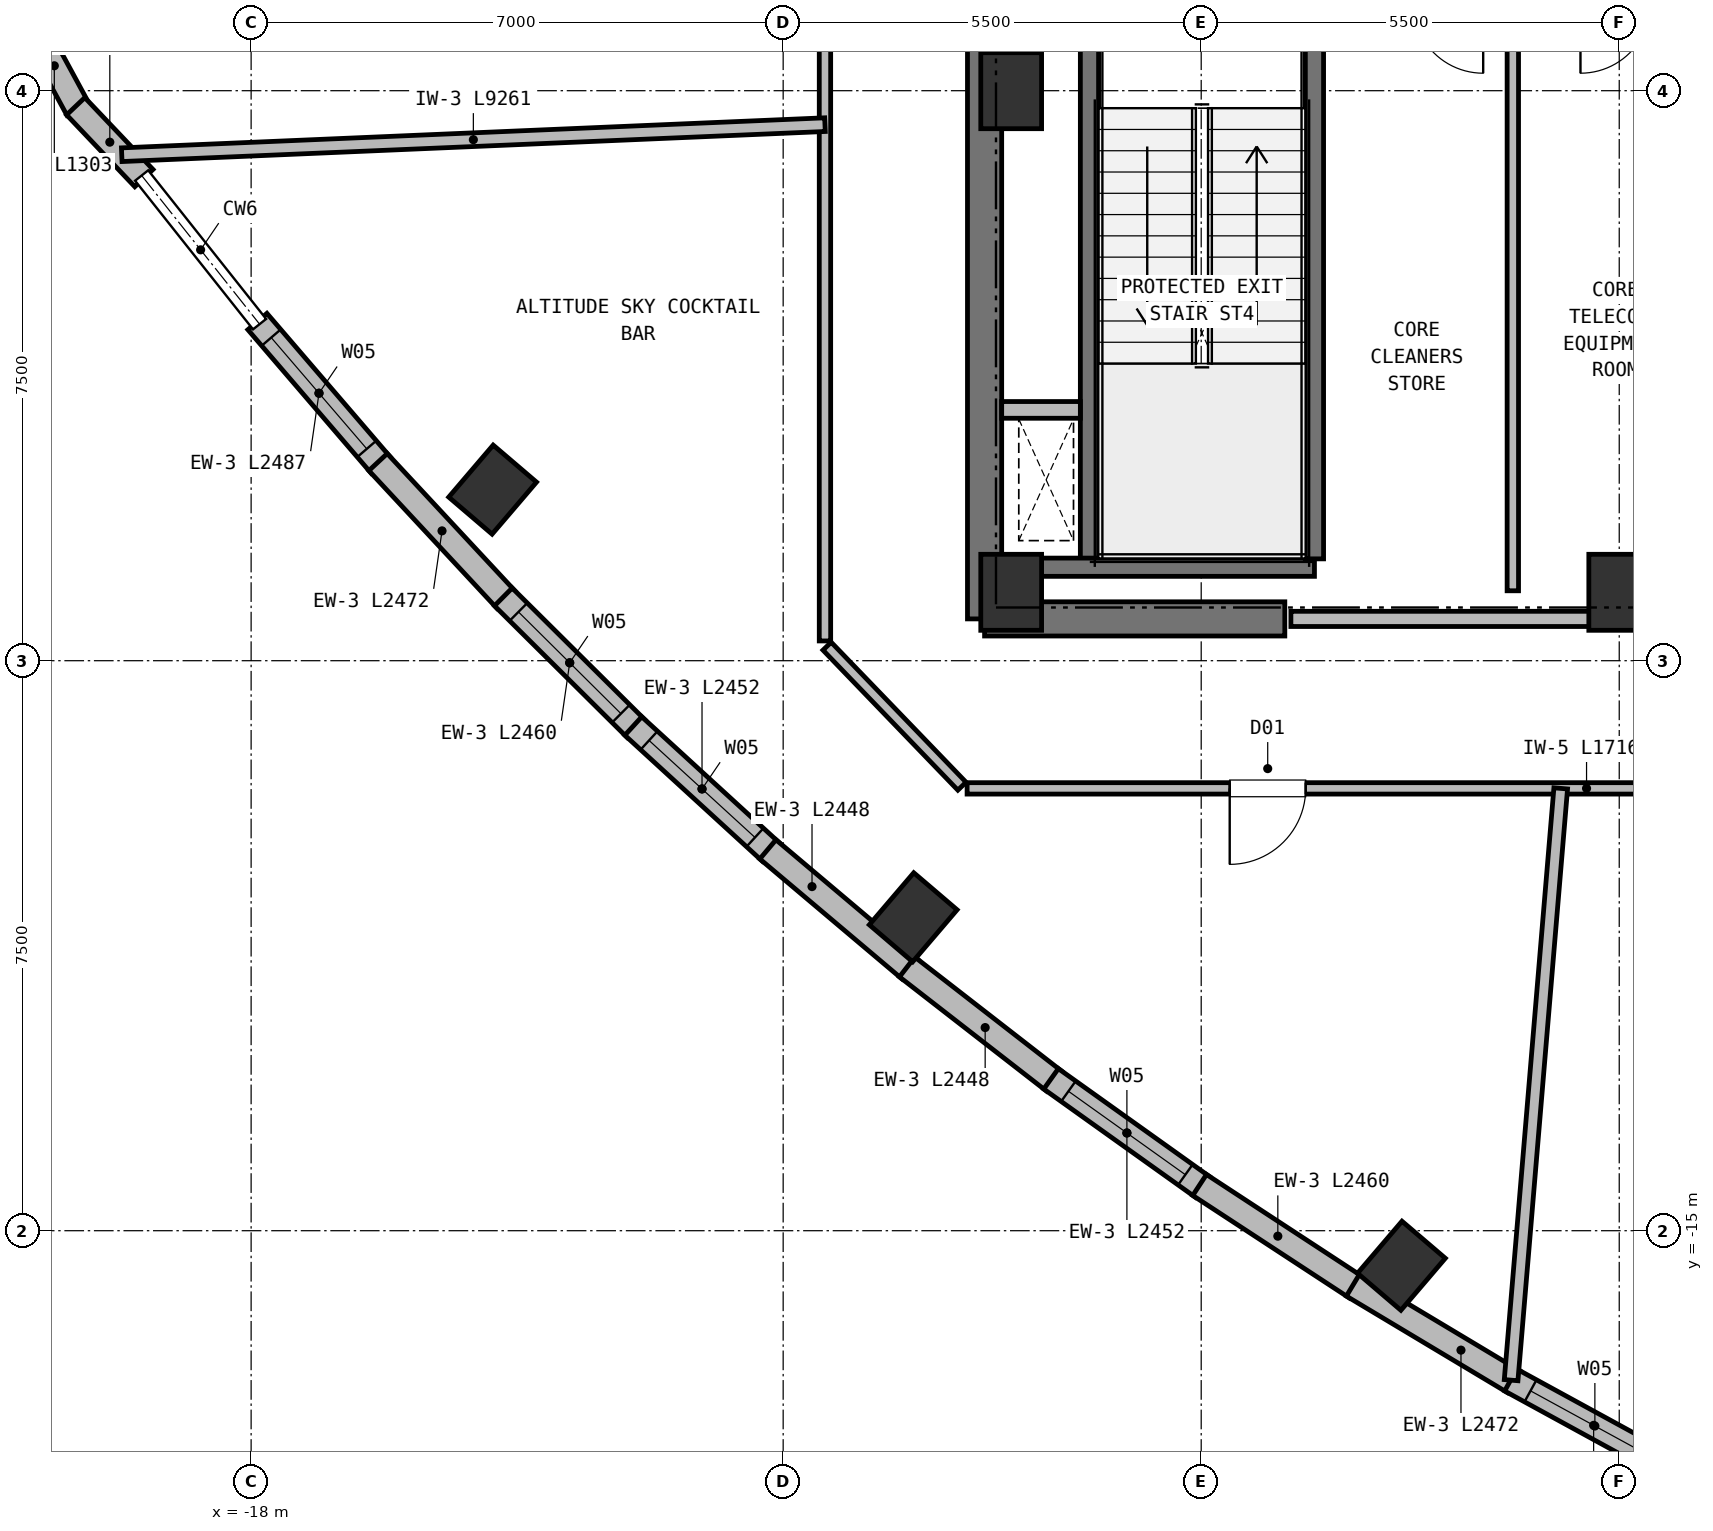
"""IFC4 building model, lengths in metres.
Left out: names, types, materials, properties, quantities, classifications, styles, units other than length and angle.
Written with IfcOpenShell. Run it as: python <this file> out.ifc"""

import sys

from ifc_helpers import new_model, si_unit, direction, frame, frame_2d, origin, origin_2d, place, context, subcontext, project, spatial, rectangle, extrude, element, fill, save


model = new_model("IFC4")
c1 = context("Model", 3, precision=1e-05, world=origin(), true_north=direction((0.0, 1.0)))
c2 = subcontext(c1, "Body", "Model", "MODEL_VIEW")
j1 = project(units=[si_unit("LENGTHUNIT", "METRE"), si_unit("PLANEANGLEUNIT", "RADIAN")], contexts=[c1])
p1 = place(None, origin())
s1 = spatial("IfcSite", under=j1, at=p1, CompositionType="ELEMENT")
p2 = place(p1, origin())
s2 = spatial("IfcBuilding", under=s1, at=p2, CompositionType="ELEMENT")
p3 = place(p2, frame((0.0, 0.0, 281.6)))
s3 = spatial("IfcBuildingStorey", under=s2, at=p3, CompositionType="ELEMENT", Elevation=281.6)
for number, where, z_axis, x_axis in (
    (1, (-8.0, -6.6, 0.0), (0.0, 0.0, 1.0), (1.0, 0.0, 0.0)),
    (2, (0.0, -6.6, 0.0), (0.0, 0.0, 1.0), (1.0, 0.0, 0.0)),
    (3, (-8.0, 0.0, 0.0), (0.0, 0.0, 1.0), (1.0, 0.0, 0.0)),
):
    element("IfcColumn", number, at=place(p3, frame(where, z_axis=z_axis, x_axis=x_axis)), inside=s3, PredefinedType="COLUMN", context=c2, shape_type="SweptSolid", body=[
        extrude(rectangle(XDim=0.8, YDim=1.0, at=origin_2d()), origin(), (0.0, 0.0, 1.0), 4.4),
    ])
p4 = place(p3, frame((-8.35, -6.95, 0.0), z_axis=(0.0, 0.0, 1.0), x_axis=(1.0, 0.0, 0.0)))
e4 = element("IfcWall", 4, at=p4, inside=s3, PredefinedType="SHEAR", context=c2, shape_type="SweptSolid", body=[
    extrude(rectangle(XDim=3.95, YDim=0.45, at=frame_2d((1.975, 0.0))), origin(), (0.0, 0.0, 1.0), 4.13),
])
p5 = place(p3, frame((-8.35, -6.95, 0.0), z_axis=(0.0, 0.0, 1.0), x_axis=(0.0, 1.0, 0.0)))
e5 = element("IfcWall", 5, at=p5, inside=s3, PredefinedType="SHEAR", context=c2, shape_type="SweptSolid", body=[
    extrude(rectangle(XDim=8.1, YDim=0.45, at=frame_2d((4.05, 0.0))), origin(), (0.0, 0.0, 1.0), 4.13),
])
for number, where, z_axis, x_axis in (
    (6, (-14.823, -5.249, 0.0), (0.0, 0.0, 1.0), (-0.76, 0.649, 0.0)),
    (7, (-9.289, -10.876, 0.0), (0.0, 0.0, 1.0), (-0.76, 0.649, 0.0)),
    (8, (-2.865, -15.461, 0.0), (0.0, 0.0, 1.0), (-0.76, 0.649, 0.0)),
):
    element("IfcColumn", number, at=place(p3, frame(where, z_axis=z_axis, x_axis=x_axis)), inside=s3, PredefinedType="COLUMN", context=c2, shape_type="SweptSolid", body=[
        extrude(rectangle(XDim=0.75, YDim=0.9, at=origin_2d()), origin(), (0.0, 0.0, 1.0), 4.4),
    ])
p6 = place(p3, frame((-20.279, -0.245, 0.0), z_axis=(0.0, 0.0, 1.0), x_axis=(-0.477236579478, 0.878774855812, 0.0)))
e9 = element("IfcWall", 9, at=p6, inside=s3, PredefinedType="SOLIDWALL", context=c2, shape_type="SweptSolid", body=[
    extrude(rectangle(XDim=1.303, YDim=0.33, at=frame_2d((0.651, 0.0))), origin(), (0.0, 0.0, 1.0), 4.13),
])
p7 = place(p3, frame((-19.411, -1.15, 0.0), z_axis=(0.0, 0.0, 1.0), x_axis=(-0.688316050819, 0.725410927809, 0.0)))
e10 = element("IfcWall", 10, at=p7, inside=s3, PredefinedType="SOLIDWALL", context=c2, shape_type="SweptSolid", body=[
    extrude(rectangle(XDim=1.303, YDim=0.33, at=frame_2d((0.652, 0.0))), origin(), (0.0, 0.0, 1.0), 4.13),
])
p8 = place(p3, frame((-16.297, -4.924, 0.0), z_axis=(0.0, 0.0, 1.0), x_axis=(-0.651591190477, 0.75857031348, 0.0)))
e11 = element("IfcWall", 11, at=p8, inside=s3, PredefinedType="SOLIDWALL", context=c2, shape_type="SweptSolid", body=[
    extrude(rectangle(XDim=2.488, YDim=0.33, at=frame_2d((1.244, 0.0))), origin(), (0.0, 0.0, 1.0), 4.13),
])
p9 = place(p8, frame((0.279, 0.0, 0.72)))
e12 = element("IfcOpeningElement", 12, at=p9, cuts=e11, PredefinedType="OPENING", context=c2, shape_type="SweptSolid", body=[
    extrude(rectangle(XDim=1.93, YDim=2.15, at=frame_2d((0.965, 1.075))), frame((0.0, 0.175, 0.0), z_axis=(0.0, -1.0, 0.0), x_axis=(1.0, 0.0, 0.0)), (0.0, 0.0, 1.0), 0.35),
])
p10 = place(p3, frame((-14.647, -6.697, 0.0), z_axis=(0.0, 0.0, 1.0), x_axis=(-0.681011582837, 0.732272643242, 0.0)))
e13 = element("IfcWall", 13, at=p10, inside=s3, PredefinedType="SOLIDWALL", context=c2, shape_type="SweptSolid", body=[
    extrude(rectangle(XDim=2.472, YDim=0.33, at=frame_2d((1.236, 0.0))), origin(), (0.0, 0.0, 1.0), 4.13),
])
p11 = place(p3, frame((-12.936, -8.394, 0.0), z_axis=(0.0, 0.0, 1.0), x_axis=(-0.709682736457, 0.704521407464, 0.0)))
e14 = element("IfcWall", 14, at=p11, inside=s3, PredefinedType="SOLIDWALL", context=c2, shape_type="SweptSolid", body=[
    extrude(rectangle(XDim=2.46, YDim=0.33, at=frame_2d((1.23, 0.0))), origin(), (0.0, 0.0, 1.0), 4.13),
])
p12 = place(p11, frame((0.28, 0.0, 0.72)))
e15 = element("IfcOpeningElement", 15, at=p12, cuts=e14, PredefinedType="OPENING", context=c2, shape_type="SweptSolid", body=[
    extrude(rectangle(XDim=1.9, YDim=2.15, at=frame_2d((0.95, 1.075))), frame((0.0, 0.175, 0.0), z_axis=(0.0, -1.0, 0.0), x_axis=(1.0, 0.0, 0.0)), (0.0, 0.0, 1.0), 0.35),
])
p13 = place(p3, frame((-11.164, -10.015, 0.0), z_axis=(0.0, 0.0, 1.0), x_axis=(-0.73744340021, 0.675408936487, 0.0)))
e16 = element("IfcWall", 16, at=p13, inside=s3, PredefinedType="SOLIDWALL", context=c2, shape_type="SweptSolid", body=[
    extrude(rectangle(XDim=2.452, YDim=0.33, at=frame_2d((1.226, 0.0))), origin(), (0.0, 0.0, 1.0), 4.13),
])
p14 = place(p13, frame((0.281, 0.0, 0.72)))
e17 = element("IfcOpeningElement", 17, at=p14, cuts=e16, PredefinedType="OPENING", context=c2, shape_type="SweptSolid", body=[
    extrude(rectangle(XDim=1.89, YDim=2.15, at=frame_2d((0.945, 1.075))), frame((0.0, 0.175, 0.0), z_axis=(0.0, -1.0, 0.0), x_axis=(1.0, 0.0, 0.0)), (0.0, 0.0, 1.0), 0.35),
])
p15 = place(p3, frame((-9.33, -11.561, 0.0), z_axis=(0.0, 0.0, 1.0), x_axis=(-0.764225429478, 0.644949217334, 0.0)))
e18 = element("IfcWall", 18, at=p15, inside=s3, PredefinedType="SOLIDWALL", context=c2, shape_type="SweptSolid", body=[
    extrude(rectangle(XDim=2.448, YDim=0.33, at=frame_2d((1.224, 0.0))), origin(), (0.0, 0.0, 1.0), 4.13),
])
p16 = place(p3, frame((-7.435, -13.031, 0.0), z_axis=(0.0, 0.0, 1.0), x_axis=(-0.789786954421, 0.613381257152, 0.0)))
e19 = element("IfcWall", 19, at=p16, inside=s3, PredefinedType="SOLIDWALL", context=c2, shape_type="SweptSolid", body=[
    extrude(rectangle(XDim=2.448, YDim=0.33, at=frame_2d((1.224, 0.0))), origin(), (0.0, 0.0, 1.0), 4.13),
])
p17 = place(p3, frame((-5.48, -14.427, 0.0), z_axis=(0.0, 0.0, 1.0), x_axis=(-0.813854547638, 0.581068649378, 0.0)))
e20 = element("IfcWall", 20, at=p17, inside=s3, PredefinedType="SOLIDWALL", context=c2, shape_type="SweptSolid", body=[
    extrude(rectangle(XDim=2.452, YDim=0.33, at=frame_2d((1.226, 0.0))), origin(), (0.0, 0.0, 1.0), 4.13),
])
p18 = place(p17, frame((0.281, 0.0, 0.72)))
e21 = element("IfcOpeningElement", 21, at=p18, cuts=e20, PredefinedType="OPENING", context=c2, shape_type="SweptSolid", body=[
    extrude(rectangle(XDim=1.89, YDim=2.15, at=frame_2d((0.945, 1.075))), frame((0.0, 0.175, 0.0), z_axis=(0.0, -1.0, 0.0), x_axis=(1.0, 0.0, 0.0)), (0.0, 0.0, 1.0), 0.35),
])
p19 = place(p3, frame((-3.463, -15.746, 0.0), z_axis=(0.0, 0.0, 1.0), x_axis=(-0.8366477668, 0.547741284101, 0.0)))
e22 = element("IfcWall", 22, at=p19, inside=s3, PredefinedType="SOLIDWALL", context=c2, shape_type="SweptSolid", body=[
    extrude(rectangle(XDim=2.46, YDim=0.33, at=frame_2d((1.23, 0.0))), origin(), (0.0, 0.0, 1.0), 4.13),
])
p20 = place(p3, frame((-1.385, -16.989, 0.0), z_axis=(0.0, 0.0, 1.0), x_axis=(-0.857841338579, 0.513914621143, 0.0)))
e23 = element("IfcWall", 23, at=p20, inside=s3, PredefinedType="SOLIDWALL", context=c2, shape_type="SweptSolid", body=[
    extrude(rectangle(XDim=2.472, YDim=0.33, at=frame_2d((1.236, 0.0))), origin(), (0.0, 0.0, 1.0), 4.13),
])
p21 = place(p3, frame((0.754, -18.157, 0.0), z_axis=(0.0, 0.0, 1.0), x_axis=(-0.877475074231, 0.479622241044, 0.0)))
e24 = element("IfcWall", 24, at=p21, inside=s3, PredefinedType="SOLIDWALL", context=c2, shape_type="SweptSolid", body=[
    extrude(rectangle(XDim=2.487, YDim=0.33, at=frame_2d((1.244, 0.0))), origin(), (0.0, 0.0, 1.0), 4.13),
])
p22 = place(p21, frame((0.26, 0.0, 0.72)))
e25 = element("IfcOpeningElement", 25, at=p22, cuts=e24, PredefinedType="OPENING", context=c2, shape_type="SweptSolid", body=[
    extrude(rectangle(XDim=1.93, YDim=2.15, at=frame_2d((0.965, 1.075))), frame((0.0, 0.175, 0.0), z_axis=(0.0, -1.0, 0.0), x_axis=(1.0, 0.0, 0.0)), (0.0, 0.0, 1.0), 0.35),
])
p23 = place(p3, frame((-6.97, -6.16, 0.0), z_axis=(0.0, 0.0, 1.0), x_axis=(0.0, 1.0, 0.0)))
e26 = element("IfcWall", 26, at=p23, inside=s3, PredefinedType="SHEAR", context=c2, shape_type="SweptSolid", body=[
    extrude(rectangle(XDim=7.22, YDim=0.24, at=frame_2d((3.61, 0.0))), origin(), (0.0, 0.0, 1.0), 4.13),
])
p24 = place(p3, frame((-7.6, -6.27, 0.0), z_axis=(0.0, 0.0, 1.0), x_axis=(1.0, 0.0, 0.0)))
e27 = element("IfcWall", 27, at=p24, inside=s3, PredefinedType="SHEAR", context=c2, shape_type="SweptSolid", body=[
    extrude(rectangle(XDim=3.59, YDim=0.24, at=frame_2d((1.795, 0.0))), origin(), (0.0, 0.0, 1.0), 4.13),
])
p25 = place(p3, frame((-4.01, -6.16, 0.0), z_axis=(0.0, 0.0, 1.0), x_axis=(0.0, 1.0, 0.0)))
e28 = element("IfcWall", 28, at=p25, inside=s3, PredefinedType="SHEAR", context=c2, shape_type="SweptSolid", body=[
    extrude(rectangle(XDim=7.22, YDim=0.24, at=frame_2d((3.61, 0.0))), origin(), (0.0, 0.0, 1.0), 4.13),
])
p26 = place(p3, frame((-8.125, -4.2, 0.0), z_axis=(0.0, 0.0, 1.0), x_axis=(1.0, 0.0, 0.0)))
e29 = element("IfcWall", 29, at=p26, inside=s3, PredefinedType="PARTITIONING", context=c2, shape_type="SweptSolid", body=[
    extrude(rectangle(XDim=1.035, YDim=0.22, at=frame_2d((0.518, 0.0))), origin(), (0.0, 0.0, 1.0), 4.13),
])
p27 = place(p3, frame((-4.32, -6.95, 0.0), z_axis=(0.0, 0.0, 1.0), x_axis=(1.0, 0.0, 0.0)))
e30 = element("IfcWall", 30, at=p27, inside=s3, PredefinedType="PARTITIONING", context=c2, shape_type="SweptSolid", body=[
    extrude(rectangle(XDim=8.64, YDim=0.2, at=frame_2d((4.32, 0.0))), origin(), (0.0, 0.0, 1.0), 4.13),
])
p28 = place(p3, frame((-1.4, -6.58, 0.0), z_axis=(0.0, 0.0, 1.0), x_axis=(0.0, 1.0, 0.0)))
e31 = element("IfcWall", 31, at=p28, inside=s3, PredefinedType="PARTITIONING", context=c2, shape_type="SweptSolid", body=[
    extrude(rectangle(XDim=7.53, YDim=0.15, at=frame_2d((3.765, 0.0))), origin(), (0.0, 0.0, 1.0), 4.13),
])
p29 = place(p3, frame((8.58, -9.18, 0.0), z_axis=(0.0, 0.0, 1.0), x_axis=(-1.0, 0.0, 0.0)))
e32 = element("IfcWall", 32, at=p29, inside=s3, PredefinedType="PARTITIONING", context=c2, shape_type="SweptSolid", body=[
    extrude(rectangle(XDim=17.16, YDim=0.15, at=frame_2d((8.58, 0.0))), origin(), (0.0, 0.0, 1.0), 3.84),
])
p30 = place(p29, frame((12.705, 0.0, 0.0)))
e33 = element("IfcOpeningElement", 33, at=p30, cuts=e32, PredefinedType="OPENING", context=c2, shape_type="SweptSolid", body=[
    extrude(rectangle(XDim=1.0, YDim=2.15, at=frame_2d((0.5, 1.075))), frame((0.0, 0.085, 0.0), z_axis=(0.0, -1.0, 0.0), x_axis=(1.0, 0.0, 0.0)), (0.0, 0.0, 1.0), 0.17),
])
p31 = place(p29, frame((4.315, 0.0, 0.0)))
e34 = element("IfcOpeningElement", 34, at=p31, cuts=e32, PredefinedType="OPENING", context=c2, shape_type="SweptSolid", body=[
    extrude(rectangle(XDim=1.0, YDim=2.15, at=frame_2d((0.5, 1.075))), frame((0.0, 0.085, 0.0), z_axis=(0.0, -1.0, 0.0), x_axis=(1.0, 0.0, 0.0)), (0.0, 0.0, 1.0), 0.17),
])
p32 = place(p3, frame((-10.45, -7.24, 0.0), z_axis=(0.0, 0.0, 1.0), x_axis=(0.0, 1.0, 0.0)))
e35 = element("IfcWall", 35, at=p32, inside=s3, PredefinedType="PARTITIONING", context=c2, shape_type="SweptSolid", body=[
    extrude(rectangle(XDim=9.63, YDim=0.15, at=frame_2d((4.815, 0.0))), origin(), (0.0, 0.0, 1.0), 4.13),
])
p33 = place(p3, frame((-8.648, -9.151, 0.0), z_axis=(0.0, 0.0, 1.0), x_axis=(-0.693764562202, 0.720201869085, 0.0)))
e36 = element("IfcWall", 36, at=p33, inside=s3, PredefinedType="PARTITIONING", context=c2, shape_type="SweptSolid", body=[
    extrude(rectangle(XDim=2.558, YDim=0.15, at=frame_2d((1.279, 0.0))), origin(), (0.0, 0.0, 1.0), 4.13),
])
p34 = place(p3, frame((-10.45, -0.447, 0.0), z_axis=(0.0, 0.0, 1.0), x_axis=(-0.999087626263, -0.042707318448, 0.0)))
e37 = element("IfcWall", 37, at=p34, inside=s3, PredefinedType="PARTITIONING", context=c2, shape_type="SweptSolid", body=[
    extrude(rectangle(XDim=9.261, YDim=0.18, at=frame_2d((4.63, 0.0))), origin(), (0.0, 0.0, 1.0), 4.13),
])
p35 = place(p3, frame((-0.77, -9.18, 0.0), z_axis=(0.0, 0.0, 1.0), x_axis=(-0.083547101012, -0.996503829352, 0.0)))
e38 = element("IfcWall", 38, at=p35, inside=s3, PredefinedType="PARTITIONING", context=c2, shape_type="SweptSolid", body=[
    extrude(rectangle(XDim=7.814, YDim=0.18, at=frame_2d((3.907, 0.0))), origin(), (0.0, 0.0, 1.0), 3.71),
])
p36 = place(p9, origin())
e39 = element("IfcWindow", 39, at=p36, inside=s3, PartitioningType="SINGLE_PANEL", PredefinedType="WINDOW", context=c2, shape_type="SweptSolid", body=[
    extrude(rectangle(XDim=1.93, YDim=2.15, at=frame_2d((0.965, 1.075))), frame((0.0, 0.03, 0.0), z_axis=(0.0, -1.0, 0.0), x_axis=(1.0, 0.0, 0.0)), (0.0, 0.0, 1.0), 0.06),
])
fill(e12, e39)
p37 = place(p12, origin())
e40 = element("IfcWindow", 40, at=p37, inside=s3, PartitioningType="SINGLE_PANEL", PredefinedType="WINDOW", context=c2, shape_type="SweptSolid", body=[
    extrude(rectangle(XDim=1.9, YDim=2.15, at=frame_2d((0.95, 1.075))), frame((0.0, 0.03, 0.0), z_axis=(0.0, -1.0, 0.0), x_axis=(1.0, 0.0, 0.0)), (0.0, 0.0, 1.0), 0.06),
])
fill(e15, e40)
p38 = place(p14, origin())
e41 = element("IfcWindow", 41, at=p38, inside=s3, PartitioningType="SINGLE_PANEL", PredefinedType="WINDOW", context=c2, shape_type="SweptSolid", body=[
    extrude(rectangle(XDim=1.89, YDim=2.15, at=frame_2d((0.945, 1.075))), frame((0.0, 0.03, 0.0), z_axis=(0.0, -1.0, 0.0), x_axis=(1.0, 0.0, 0.0)), (0.0, 0.0, 1.0), 0.06),
])
fill(e17, e41)
p39 = place(p18, origin())
e42 = element("IfcWindow", 42, at=p39, inside=s3, PartitioningType="SINGLE_PANEL", PredefinedType="WINDOW", context=c2, shape_type="SweptSolid", body=[
    extrude(rectangle(XDim=1.89, YDim=2.15, at=frame_2d((0.945, 1.075))), frame((0.0, 0.03, 0.0), z_axis=(0.0, -1.0, 0.0), x_axis=(1.0, 0.0, 0.0)), (0.0, 0.0, 1.0), 0.06),
])
fill(e21, e42)
p40 = place(p22, origin())
e43 = element("IfcWindow", 43, at=p40, inside=s3, PartitioningType="SINGLE_PANEL", PredefinedType="WINDOW", context=c2, shape_type="SweptSolid", body=[
    extrude(rectangle(XDim=1.93, YDim=2.15, at=frame_2d((0.965, 1.075))), frame((0.0, 0.03, 0.0), z_axis=(0.0, -1.0, 0.0), x_axis=(1.0, 0.0, 0.0)), (0.0, 0.0, 1.0), 0.06),
])
fill(e25, e43)
p41 = place(p30, origin())
e44 = element("IfcDoor", 44, at=p41, inside=s3, OperationType="SINGLE_SWING_RIGHT", PredefinedType="DOOR", context=c2, shape_type="SweptSolid", body=[
    extrude(rectangle(XDim=1.0, YDim=2.15, at=frame_2d((0.5, 1.075))), frame((0.0, 0.025, 0.0), z_axis=(0.0, -1.0, 0.0), x_axis=(1.0, 0.0, 0.0)), (0.0, 0.0, 1.0), 0.05),
])
fill(e33, e44)
save(model, sys.argv[1])
